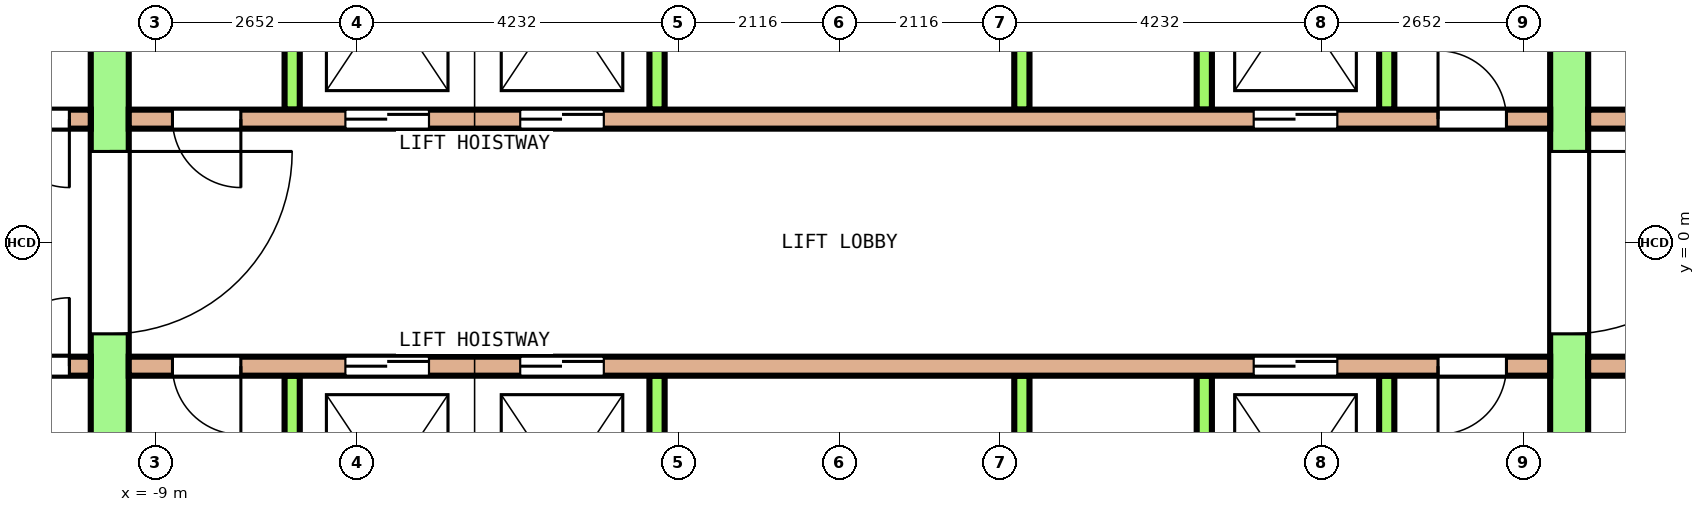
"""IFC4 building model, lengths in metres.
Left out: names, types, materials, properties, quantities, classifications, styles, units other than length and angle.
Written with IfcOpenShell. Run it as: python <this file> out.ifc"""

import sys

from ifc_helpers import new_model, si_unit, direction, frame, frame_2d, origin, place, context, subcontext, project, spatial, rectangle, extrude, element, fill, save


model = new_model("IFC4")
c1 = context("Model", 3, precision=1e-05, world=origin(), true_north=direction((0.0, 1.0)))
c2 = subcontext(c1, "Body", "Model", "MODEL_VIEW")
j1 = project(units=[si_unit("LENGTHUNIT", "METRE"), si_unit("PLANEANGLEUNIT", "RADIAN")], contexts=[c1])
p1 = place(None, origin())
s1 = spatial("IfcSite", under=j1, at=p1, CompositionType="ELEMENT")
p2 = place(p1, origin())
s2 = spatial("IfcBuilding", under=s1, at=p2, CompositionType="ELEMENT")
p3 = place(p2, frame((0.0, 0.0, 223.4)))
s3 = spatial("IfcBuildingStorey", under=s2, at=p3, CompositionType="ELEMENT", Elevation=223.4)
p4 = place(p3, frame((-9.6, -7.8, 0.0), z_axis=(0.0, 0.0, 1.0), x_axis=(0.0, 1.0, 0.0)))
e1 = element("IfcWall", 1, at=p4, inside=s3, PredefinedType="SHEAR", context=c2, shape_type="SweptSolid", body=[
    extrude(rectangle(XDim=15.6, YDim=0.5, at=frame_2d((7.8, 0.0))), origin(), (0.0, 0.0, 1.0), 3.7),
])
p5 = place(p4, frame((6.6, 0.0, 0.0)))
e2 = element("IfcOpeningElement", 2, at=p5, cuts=e1, PredefinedType="OPENING", context=c2, shape_type="SweptSolid", body=[
    extrude(rectangle(XDim=2.4, YDim=2.1, at=frame_2d((1.2, 1.05))), frame((0.0, 0.26, 0.0), z_axis=(0.0, -1.0, 0.0), x_axis=(1.0, 0.0, 0.0)), (0.0, 0.0, 1.0), 0.52),
])
p6 = place(p4, frame((13.5, 0.0, 0.0)))
e3 = element("IfcOpeningElement", 3, at=p6, cuts=e1, PredefinedType="OPENING", context=c2, shape_type="SweptSolid", body=[
    extrude(rectangle(XDim=1.2, YDim=2.1, at=frame_2d((0.6, 1.05))), frame((0.0, 0.26, 0.0), z_axis=(0.0, -1.0, 0.0), x_axis=(1.0, 0.0, 0.0)), (0.0, 0.0, 1.0), 0.52),
])
p7 = place(p4, frame((0.9, 0.0, 0.0)))
e4 = element("IfcOpeningElement", 4, at=p7, cuts=e1, PredefinedType="OPENING", context=c2, shape_type="SweptSolid", body=[
    extrude(rectangle(XDim=1.2, YDim=2.1, at=frame_2d((0.6, 1.05))), frame((0.0, 0.26, 0.0), z_axis=(0.0, -1.0, 0.0), x_axis=(1.0, 0.0, 0.0)), (0.0, 0.0, 1.0), 0.52),
])
p8 = place(p3, frame((9.6, -7.8, 0.0), z_axis=(0.0, 0.0, 1.0), x_axis=(0.0, 1.0, 0.0)))
e5 = element("IfcWall", 5, at=p8, inside=s3, PredefinedType="SHEAR", context=c2, shape_type="SweptSolid", body=[
    extrude(rectangle(XDim=15.6, YDim=0.5, at=frame_2d((7.8, 0.0))), origin(), (0.0, 0.0, 1.0), 3.7),
])
p9 = place(p8, frame((6.6, 0.0, 0.0)))
e6 = element("IfcOpeningElement", 6, at=p9, cuts=e5, PredefinedType="OPENING", context=c2, shape_type="SweptSolid", body=[
    extrude(rectangle(XDim=2.4, YDim=2.1, at=frame_2d((1.2, 1.05))), frame((0.0, 0.26, 0.0), z_axis=(0.0, -1.0, 0.0), x_axis=(1.0, 0.0, 0.0)), (0.0, 0.0, 1.0), 0.52),
])
p10 = place(p8, frame((13.5, 0.0, 0.0)))
e7 = element("IfcOpeningElement", 7, at=p10, cuts=e5, PredefinedType="OPENING", context=c2, shape_type="SweptSolid", body=[
    extrude(rectangle(XDim=1.2, YDim=2.1, at=frame_2d((0.6, 1.05))), frame((0.0, 0.26, 0.0), z_axis=(0.0, -1.0, 0.0), x_axis=(1.0, 0.0, 0.0)), (0.0, 0.0, 1.0), 0.52),
])
p11 = place(p8, frame((1.0, 0.0, 0.0)))
e8 = element("IfcOpeningElement", 8, at=p11, cuts=e5, PredefinedType="OPENING", context=c2, shape_type="SweptSolid", body=[
    extrude(rectangle(XDim=1.0, YDim=2.1, at=frame_2d((0.5, 1.05))), frame((0.0, 0.26, 0.0), z_axis=(0.0, -1.0, 0.0), x_axis=(1.0, 0.0, 0.0)), (0.0, 0.0, 1.0), 0.52),
])
p12 = place(p3, frame((-12.9, 1.625, 0.0), z_axis=(0.0, 0.0, 1.0), x_axis=(1.0, 0.0, 0.0)))
e9 = element("IfcWall", 9, at=p12, inside=s3, PredefinedType="SOLIDWALL", context=c2, shape_type="SweptSolid", body=[
    extrude(rectangle(XDim=3.05, YDim=0.25, at=frame_2d((1.525, 0.0))), origin(), (0.0, 0.0, 1.0), 3.7),
])
p13 = place(p12, frame((0.281, 0.0, 0.0)))
e10 = element("IfcOpeningElement", 10, at=p13, cuts=e9, PredefinedType="OPENING", context=c2, shape_type="SweptSolid", body=[
    extrude(rectangle(XDim=0.9, YDim=2.1, at=frame_2d((0.45, 1.05))), frame((0.0, 0.135, 0.0), z_axis=(0.0, -1.0, 0.0), x_axis=(1.0, 0.0, 0.0)), (0.0, 0.0, 1.0), 0.27),
])
p14 = place(p12, frame((1.869, 0.0, 0.0)))
e11 = element("IfcOpeningElement", 11, at=p14, cuts=e9, PredefinedType="OPENING", context=c2, shape_type="SweptSolid", body=[
    extrude(rectangle(XDim=0.9, YDim=2.1, at=frame_2d((0.45, 1.05))), frame((0.0, 0.135, 0.0), z_axis=(0.0, -1.0, 0.0), x_axis=(1.0, 0.0, 0.0)), (0.0, 0.0, 1.0), 0.27),
])
p15 = place(p3, frame((-9.35, 1.625, 0.0), z_axis=(0.0, 0.0, 1.0), x_axis=(1.0, 0.0, 0.0)))
e12 = element("IfcWall", 12, at=p15, inside=s3, PredefinedType="SOLIDWALL", context=c2, shape_type="SweptSolid", body=[
    extrude(rectangle(XDim=18.7, YDim=0.25, at=frame_2d((9.35, 0.0))), origin(), (0.0, 0.0, 1.0), 3.7),
])
p16 = place(p15, frame((2.85, 0.0, 0.0)))
e13 = element("IfcOpeningElement", 13, at=p16, cuts=e12, PredefinedType="OPENING", context=c2, shape_type="SweptSolid", body=[
    extrude(rectangle(XDim=1.1, YDim=2.1, at=frame_2d((0.55, 1.05))), frame((0.0, 0.135, 0.0), z_axis=(0.0, -1.0, 0.0), x_axis=(1.0, 0.0, 0.0)), (0.0, 0.0, 1.0), 0.27),
])
p17 = place(p15, frame((5.15, 0.0, 0.0)))
e14 = element("IfcOpeningElement", 14, at=p17, cuts=e12, PredefinedType="OPENING", context=c2, shape_type="SweptSolid", body=[
    extrude(rectangle(XDim=1.1, YDim=2.1, at=frame_2d((0.55, 1.05))), frame((0.0, 0.135, 0.0), z_axis=(0.0, -1.0, 0.0), x_axis=(1.0, 0.0, 0.0)), (0.0, 0.0, 1.0), 0.27),
])
p18 = place(p15, frame((14.8, 0.0, 0.0)))
e15 = element("IfcOpeningElement", 15, at=p18, cuts=e12, PredefinedType="OPENING", context=c2, shape_type="SweptSolid", body=[
    extrude(rectangle(XDim=1.1, YDim=2.1, at=frame_2d((0.55, 1.05))), frame((0.0, 0.135, 0.0), z_axis=(0.0, -1.0, 0.0), x_axis=(1.0, 0.0, 0.0)), (0.0, 0.0, 1.0), 0.27),
])
p19 = place(p15, frame((0.575, 0.0, 0.0)))
e16 = element("IfcOpeningElement", 16, at=p19, cuts=e12, PredefinedType="OPENING", context=c2, shape_type="SweptSolid", body=[
    extrude(rectangle(XDim=0.9, YDim=2.1, at=frame_2d((0.45, 1.05))), frame((0.0, 0.135, 0.0), z_axis=(0.0, -1.0, 0.0), x_axis=(1.0, 0.0, 0.0)), (0.0, 0.0, 1.0), 0.27),
])
p20 = place(p15, frame((17.225, 0.0, 0.0)))
e17 = element("IfcOpeningElement", 17, at=p20, cuts=e12, PredefinedType="OPENING", context=c2, shape_type="SweptSolid", body=[
    extrude(rectangle(XDim=0.9, YDim=2.1, at=frame_2d((0.45, 1.05))), frame((0.0, 0.135, 0.0), z_axis=(0.0, -1.0, 0.0), x_axis=(1.0, 0.0, 0.0)), (0.0, 0.0, 1.0), 0.27),
])
p21 = place(p3, frame((9.85, 1.625, 0.0), z_axis=(0.0, 0.0, 1.0), x_axis=(1.0, 0.0, 0.0)))
e18 = element("IfcWall", 18, at=p21, inside=s3, PredefinedType="SOLIDWALL", context=c2, shape_type="SweptSolid", body=[
    extrude(rectangle(XDim=3.05, YDim=0.25, at=frame_2d((1.525, 0.0))), origin(), (0.0, 0.0, 1.0), 3.7),
])
p22 = place(p21, frame((1.075, 0.0, 0.0)))
e19 = element("IfcOpeningElement", 19, at=p22, cuts=e18, PredefinedType="OPENING", context=c2, shape_type="SweptSolid", body=[
    extrude(rectangle(XDim=0.9, YDim=2.1, at=frame_2d((0.45, 1.05))), frame((0.0, 0.135, 0.0), z_axis=(0.0, -1.0, 0.0), x_axis=(1.0, 0.0, 0.0)), (0.0, 0.0, 1.0), 0.27),
])
for number, where, z_axis, x_axis in (
    (20, (-7.2, 1.75, 0.0), (0.0, 0.0, 1.0), (0.0, 1.0, 0.0)),
    (21, (-2.4, 1.75, 0.0), (0.0, 0.0, 1.0), (0.0, 1.0, 0.0)),
    (22, (2.4, 1.75, 0.0), (0.0, 0.0, 1.0), (0.0, 1.0, 0.0)),
    (23, (4.8, 1.75, 0.0), (0.0, 0.0, 1.0), (0.0, 1.0, 0.0)),
    (24, (7.2, 1.75, 0.0), (0.0, 0.0, 1.0), (0.0, 1.0, 0.0)),
):
    element("IfcWall", number, at=place(p3, frame(where, z_axis=z_axis, x_axis=x_axis)), inside=s3, PredefinedType="SOLIDWALL", context=c2, shape_type="SweptSolid", body=[
        extrude(rectangle(XDim=2.9, YDim=0.2, at=frame_2d((1.45, 0.0))), origin(), (0.0, 0.0, 1.0), 3.7),
    ])
p23 = place(p3, frame((-12.9, -1.625, 0.0), z_axis=(0.0, 0.0, 1.0), x_axis=(1.0, 0.0, 0.0)))
e25 = element("IfcWall", 25, at=p23, inside=s3, PredefinedType="SOLIDWALL", context=c2, shape_type="SweptSolid", body=[
    extrude(rectangle(XDim=3.05, YDim=0.25, at=frame_2d((1.525, 0.0))), origin(), (0.0, 0.0, 1.0), 3.7),
])
p24 = place(p23, frame((0.281, 0.0, 0.0)))
e26 = element("IfcOpeningElement", 26, at=p24, cuts=e25, PredefinedType="OPENING", context=c2, shape_type="SweptSolid", body=[
    extrude(rectangle(XDim=0.9, YDim=2.1, at=frame_2d((0.45, 1.05))), frame((0.0, 0.135, 0.0), z_axis=(0.0, -1.0, 0.0), x_axis=(1.0, 0.0, 0.0)), (0.0, 0.0, 1.0), 0.27),
])
p25 = place(p23, frame((1.869, 0.0, 0.0)))
e27 = element("IfcOpeningElement", 27, at=p25, cuts=e25, PredefinedType="OPENING", context=c2, shape_type="SweptSolid", body=[
    extrude(rectangle(XDim=0.9, YDim=2.1, at=frame_2d((0.45, 1.05))), frame((0.0, 0.135, 0.0), z_axis=(0.0, -1.0, 0.0), x_axis=(1.0, 0.0, 0.0)), (0.0, 0.0, 1.0), 0.27),
])
p26 = place(p3, frame((-9.35, -1.625, 0.0), z_axis=(0.0, 0.0, 1.0), x_axis=(1.0, 0.0, 0.0)))
e28 = element("IfcWall", 28, at=p26, inside=s3, PredefinedType="SOLIDWALL", context=c2, shape_type="SweptSolid", body=[
    extrude(rectangle(XDim=18.7, YDim=0.25, at=frame_2d((9.35, 0.0))), origin(), (0.0, 0.0, 1.0), 3.7),
])
p27 = place(p26, frame((2.85, 0.0, 0.0)))
e29 = element("IfcOpeningElement", 29, at=p27, cuts=e28, PredefinedType="OPENING", context=c2, shape_type="SweptSolid", body=[
    extrude(rectangle(XDim=1.1, YDim=2.1, at=frame_2d((0.55, 1.05))), frame((0.0, 0.135, 0.0), z_axis=(0.0, -1.0, 0.0), x_axis=(1.0, 0.0, 0.0)), (0.0, 0.0, 1.0), 0.27),
])
p28 = place(p26, frame((5.15, 0.0, 0.0)))
e30 = element("IfcOpeningElement", 30, at=p28, cuts=e28, PredefinedType="OPENING", context=c2, shape_type="SweptSolid", body=[
    extrude(rectangle(XDim=1.1, YDim=2.1, at=frame_2d((0.55, 1.05))), frame((0.0, 0.135, 0.0), z_axis=(0.0, -1.0, 0.0), x_axis=(1.0, 0.0, 0.0)), (0.0, 0.0, 1.0), 0.27),
])
p29 = place(p26, frame((14.8, 0.0, 0.0)))
e31 = element("IfcOpeningElement", 31, at=p29, cuts=e28, PredefinedType="OPENING", context=c2, shape_type="SweptSolid", body=[
    extrude(rectangle(XDim=1.1, YDim=2.1, at=frame_2d((0.55, 1.05))), frame((0.0, 0.135, 0.0), z_axis=(0.0, -1.0, 0.0), x_axis=(1.0, 0.0, 0.0)), (0.0, 0.0, 1.0), 0.27),
])
p30 = place(p26, frame((0.575, 0.0, 0.0)))
e32 = element("IfcOpeningElement", 32, at=p30, cuts=e28, PredefinedType="OPENING", context=c2, shape_type="SweptSolid", body=[
    extrude(rectangle(XDim=0.9, YDim=2.1, at=frame_2d((0.45, 1.05))), frame((0.0, 0.135, 0.0), z_axis=(0.0, -1.0, 0.0), x_axis=(1.0, 0.0, 0.0)), (0.0, 0.0, 1.0), 0.27),
])
p31 = place(p26, frame((17.225, 0.0, 0.0)))
e33 = element("IfcOpeningElement", 33, at=p31, cuts=e28, PredefinedType="OPENING", context=c2, shape_type="SweptSolid", body=[
    extrude(rectangle(XDim=0.9, YDim=2.1, at=frame_2d((0.45, 1.05))), frame((0.0, 0.135, 0.0), z_axis=(0.0, -1.0, 0.0), x_axis=(1.0, 0.0, 0.0)), (0.0, 0.0, 1.0), 0.27),
])
p32 = place(p3, frame((9.85, -1.625, 0.0), z_axis=(0.0, 0.0, 1.0), x_axis=(1.0, 0.0, 0.0)))
e34 = element("IfcWall", 34, at=p32, inside=s3, PredefinedType="SOLIDWALL", context=c2, shape_type="SweptSolid", body=[
    extrude(rectangle(XDim=3.05, YDim=0.25, at=frame_2d((1.525, 0.0))), origin(), (0.0, 0.0, 1.0), 3.7),
])
p33 = place(p32, frame((1.075, 0.0, 0.0)))
e35 = element("IfcOpeningElement", 35, at=p33, cuts=e34, PredefinedType="OPENING", context=c2, shape_type="SweptSolid", body=[
    extrude(rectangle(XDim=0.9, YDim=2.1, at=frame_2d((0.45, 1.05))), frame((0.0, 0.135, 0.0), z_axis=(0.0, -1.0, 0.0), x_axis=(1.0, 0.0, 0.0)), (0.0, 0.0, 1.0), 0.27),
])
for number, where, z_axis, x_axis in (
    (36, (-7.2, -4.65, 0.0), (0.0, 0.0, 1.0), (0.0, 1.0, 0.0)),
    (37, (-2.4, -4.65, 0.0), (0.0, 0.0, 1.0), (0.0, 1.0, 0.0)),
    (38, (2.4, -4.65, 0.0), (0.0, 0.0, 1.0), (0.0, 1.0, 0.0)),
    (39, (4.8, -4.65, 0.0), (0.0, 0.0, 1.0), (0.0, 1.0, 0.0)),
    (40, (7.2, -4.65, 0.0), (0.0, 0.0, 1.0), (0.0, 1.0, 0.0)),
):
    element("IfcWall", number, at=place(p3, frame(where, z_axis=z_axis, x_axis=x_axis)), inside=s3, PredefinedType="SOLIDWALL", context=c2, shape_type="SweptSolid", body=[
        extrude(rectangle(XDim=2.9, YDim=0.2, at=frame_2d((1.45, 0.0))), origin(), (0.0, 0.0, 1.0), 3.7),
    ])
p34 = place(p16, origin())
e41 = element("IfcDoor", 41, at=p34, inside=s3, OperationType="DOUBLE_DOOR_SLIDING", PredefinedType="DOOR", context=c2, shape_type="SweptSolid", body=[
    extrude(rectangle(XDim=1.1, YDim=2.1, at=frame_2d((0.55, 1.05))), frame((0.0, 0.075, 0.0), z_axis=(0.0, -1.0, 0.0), x_axis=(1.0, 0.0, 0.0)), (0.0, 0.0, 1.0), 0.15),
])
fill(e13, e41)
p35 = place(p17, origin())
e42 = element("IfcDoor", 42, at=p35, inside=s3, OperationType="DOUBLE_DOOR_SLIDING", PredefinedType="DOOR", context=c2, shape_type="SweptSolid", body=[
    extrude(rectangle(XDim=1.1, YDim=2.1, at=frame_2d((0.55, 1.05))), frame((0.0, 0.075, 0.0), z_axis=(0.0, -1.0, 0.0), x_axis=(1.0, 0.0, 0.0)), (0.0, 0.0, 1.0), 0.15),
])
fill(e14, e42)
p36 = place(p18, origin())
e43 = element("IfcDoor", 43, at=p36, inside=s3, OperationType="DOUBLE_DOOR_SLIDING", PredefinedType="DOOR", context=c2, shape_type="SweptSolid", body=[
    extrude(rectangle(XDim=1.1, YDim=2.1, at=frame_2d((0.55, 1.05))), frame((0.0, 0.075, 0.0), z_axis=(0.0, -1.0, 0.0), x_axis=(1.0, 0.0, 0.0)), (0.0, 0.0, 1.0), 0.15),
])
fill(e15, e43)
p37 = place(p27, origin())
e44 = element("IfcDoor", 44, at=p37, inside=s3, OperationType="DOUBLE_DOOR_SLIDING", PredefinedType="DOOR", context=c2, shape_type="SweptSolid", body=[
    extrude(rectangle(XDim=1.1, YDim=2.1, at=frame_2d((0.55, 1.05))), frame((0.0, 0.075, 0.0), z_axis=(0.0, -1.0, 0.0), x_axis=(1.0, 0.0, 0.0)), (0.0, 0.0, 1.0), 0.15),
])
fill(e29, e44)
p38 = place(p28, origin())
e45 = element("IfcDoor", 45, at=p38, inside=s3, OperationType="DOUBLE_DOOR_SLIDING", PredefinedType="DOOR", context=c2, shape_type="SweptSolid", body=[
    extrude(rectangle(XDim=1.1, YDim=2.1, at=frame_2d((0.55, 1.05))), frame((0.0, 0.075, 0.0), z_axis=(0.0, -1.0, 0.0), x_axis=(1.0, 0.0, 0.0)), (0.0, 0.0, 1.0), 0.15),
])
fill(e30, e45)
p39 = place(p29, origin())
e46 = element("IfcDoor", 46, at=p39, inside=s3, OperationType="DOUBLE_DOOR_SLIDING", PredefinedType="DOOR", context=c2, shape_type="SweptSolid", body=[
    extrude(rectangle(XDim=1.1, YDim=2.1, at=frame_2d((0.55, 1.05))), frame((0.0, 0.075, 0.0), z_axis=(0.0, -1.0, 0.0), x_axis=(1.0, 0.0, 0.0)), (0.0, 0.0, 1.0), 0.15),
])
fill(e31, e46)
p40 = place(p5, origin())
e47 = element("IfcDoor", 47, at=p40, inside=s3, OperationType="DOUBLE_DOOR_SINGLE_SWING", PredefinedType="DOOR", context=c2, shape_type="SweptSolid", body=[
    extrude(rectangle(XDim=2.4, YDim=2.1, at=frame_2d((1.2, 1.05))), frame((0.0, 0.2, 0.0), z_axis=(0.0, -1.0, 0.0), x_axis=(1.0, 0.0, 0.0)), (0.0, 0.0, 1.0), 0.4),
])
fill(e2, e47)
p41 = place(p9, origin())
e48 = element("IfcDoor", 48, at=p41, inside=s3, OperationType="DOUBLE_DOOR_SINGLE_SWING", PredefinedType="DOOR", context=c2, shape_type="SweptSolid", body=[
    extrude(rectangle(XDim=2.4, YDim=2.1, at=frame_2d((1.2, 1.05))), frame((0.0, 0.2, 0.0), z_axis=(0.0, -1.0, 0.0), x_axis=(1.0, 0.0, 0.0)), (0.0, 0.0, 1.0), 0.4),
])
fill(e6, e48)
p42 = place(p14, origin())
e49 = element("IfcDoor", 49, at=p42, inside=s3, OperationType="SINGLE_SWING_RIGHT", PredefinedType="DOOR", context=c2, shape_type="SweptSolid", body=[
    extrude(rectangle(XDim=0.9, YDim=2.1, at=frame_2d((0.45, 1.05))), frame((0.0, 0.075, 0.0), z_axis=(0.0, -1.0, 0.0), x_axis=(1.0, 0.0, 0.0)), (0.0, 0.0, 1.0), 0.15),
])
fill(e11, e49)
p43 = place(p19, origin())
e50 = element("IfcDoor", 50, at=p43, inside=s3, OperationType="SINGLE_SWING_LEFT", PredefinedType="DOOR", context=c2, shape_type="SweptSolid", body=[
    extrude(rectangle(XDim=0.9, YDim=2.1, at=frame_2d((0.45, 1.05))), frame((0.0, 0.075, 0.0), z_axis=(0.0, -1.0, 0.0), x_axis=(1.0, 0.0, 0.0)), (0.0, 0.0, 1.0), 0.15),
])
fill(e16, e50)
p44 = place(p20, origin())
e51 = element("IfcDoor", 51, at=p44, inside=s3, OperationType="SINGLE_SWING_RIGHT", PredefinedType="DOOR", context=c2, shape_type="SweptSolid", body=[
    extrude(rectangle(XDim=0.9, YDim=2.1, at=frame_2d((0.45, 1.05))), frame((0.0, 0.075, 0.0), z_axis=(0.0, -1.0, 0.0), x_axis=(1.0, 0.0, 0.0)), (0.0, 0.0, 1.0), 0.15),
])
fill(e17, e51)
p45 = place(p25, origin())
e52 = element("IfcDoor", 52, at=p45, inside=s3, OperationType="SINGLE_SWING_LEFT", PredefinedType="DOOR", context=c2, shape_type="SweptSolid", body=[
    extrude(rectangle(XDim=0.9, YDim=2.1, at=frame_2d((0.45, 1.05))), frame((0.0, 0.075, 0.0), z_axis=(0.0, -1.0, 0.0), x_axis=(1.0, 0.0, 0.0)), (0.0, 0.0, 1.0), 0.15),
])
fill(e27, e52)
p46 = place(p30, origin())
e53 = element("IfcDoor", 53, at=p46, inside=s3, OperationType="SINGLE_SWING_RIGHT", PredefinedType="DOOR", context=c2, shape_type="SweptSolid", body=[
    extrude(rectangle(XDim=0.9, YDim=2.1, at=frame_2d((0.45, 1.05))), frame((0.0, 0.075, 0.0), z_axis=(0.0, -1.0, 0.0), x_axis=(1.0, 0.0, 0.0)), (0.0, 0.0, 1.0), 0.15),
])
fill(e32, e53)
p47 = place(p31, origin())
e54 = element("IfcDoor", 54, at=p47, inside=s3, OperationType="SINGLE_SWING_LEFT", PredefinedType="DOOR", context=c2, shape_type="SweptSolid", body=[
    extrude(rectangle(XDim=0.9, YDim=2.1, at=frame_2d((0.45, 1.05))), frame((0.0, 0.075, 0.0), z_axis=(0.0, -1.0, 0.0), x_axis=(1.0, 0.0, 0.0)), (0.0, 0.0, 1.0), 0.15),
])
fill(e33, e54)
save(model, sys.argv[1])
